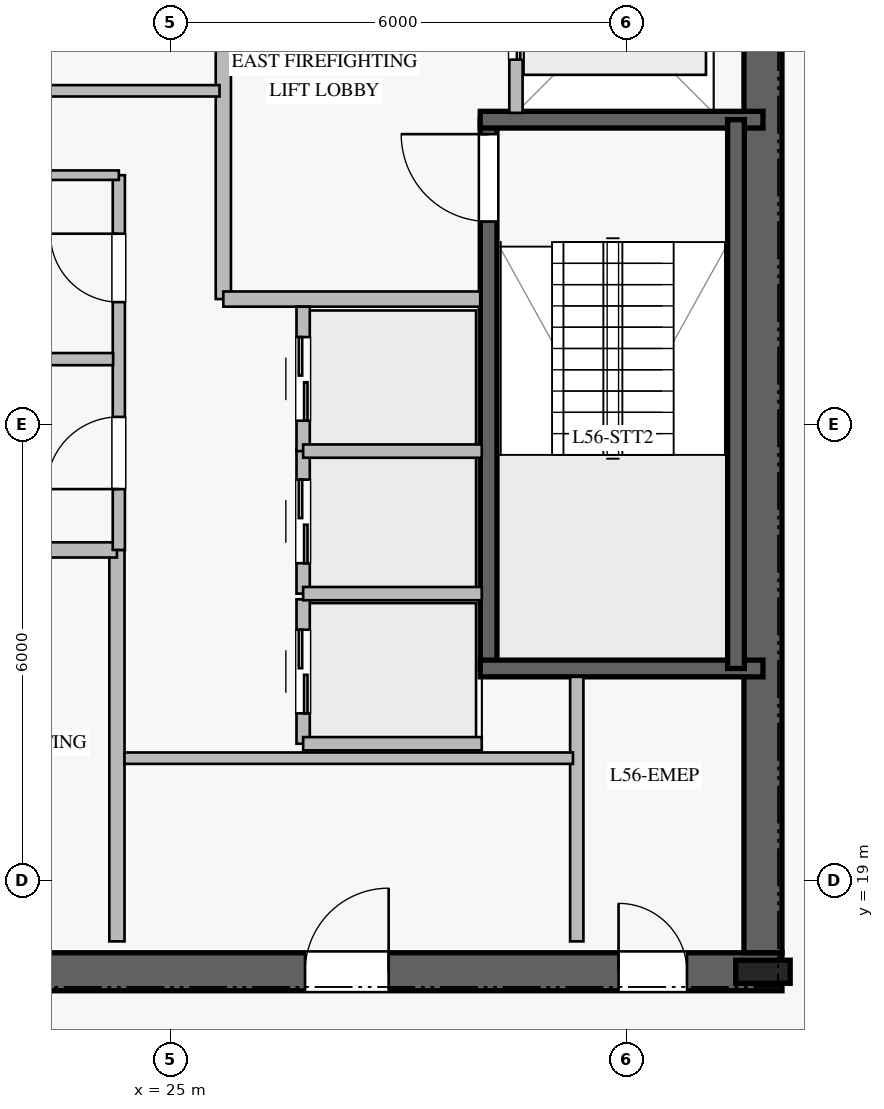
"""IFC4 building model, lengths in metres.
Left out: names, types, materials, properties, quantities, classifications, styles, units other than length and angle.
Written with IfcOpenShell. Run it as: python <this file> out.ifc"""

import sys

from ifc_helpers import new_model, si_unit, direction, frame, frame_2d, origin, origin_2d, place, context, subcontext, project, spatial, rectangle, i_section, extrude, element, fill, save


model = new_model("IFC4")
c1 = context("Model", 3, precision=1e-05, world=origin(), true_north=direction((0.0, 1.0)))
c2 = subcontext(c1, "Body", "Model", "MODEL_VIEW")
j1 = project(units=[si_unit("LENGTHUNIT", "METRE"), si_unit("PLANEANGLEUNIT", "RADIAN")], contexts=[c1])
p1 = place(None, origin())
s1 = spatial("IfcSite", under=j1, at=p1, CompositionType="ELEMENT")
p2 = place(p1, origin())
s2 = spatial("IfcBuilding", under=s1, at=p2, CompositionType="ELEMENT")
p3 = place(p2, frame((0.0, 0.0, 232.8)))
s3 = spatial("IfcBuildingStorey", under=s2, at=p3, CompositionType="ELEMENT", Elevation=232.8)
p4 = place(p3, frame((16.95, 17.8, 0.0), z_axis=(0.0, 0.0, 1.0), x_axis=(1.0, 0.0, 0.0)))
e1 = element("IfcWall", 1, at=p4, inside=s3, PredefinedType="SHEAR", context=c2, shape_type="SweptSolid", body=[
    extrude(rectangle(XDim=16.1, YDim=0.5, at=frame_2d((8.05, 0.0))), origin(), (0.0, 0.0, 1.0), 3.78),
])
p5 = place(p4, frame((5.0, 0.0, 0.0)))
e2 = element("IfcOpeningElement", 2, at=p5, cuts=e1, PredefinedType="OPENING", context=c2, shape_type="SweptSolid", body=[
    extrude(rectangle(XDim=1.2, YDim=2.25, at=frame_2d((0.6, 1.125))), frame((0.0, 0.26, 0.0), z_axis=(0.0, -1.0, 0.0), x_axis=(1.0, 0.0, 0.0)), (0.0, 0.0, 1.0), 0.52),
])
p6 = place(p4, frame((13.95, 0.0, 0.0)))
e3 = element("IfcOpeningElement", 3, at=p6, cuts=e1, PredefinedType="OPENING", context=c2, shape_type="SweptSolid", body=[
    extrude(rectangle(XDim=0.9, YDim=2.1, at=frame_2d((0.45, 1.05))), frame((0.0, 0.26, 0.0), z_axis=(0.0, -1.0, 0.0), x_axis=(1.0, 0.0, 0.0)), (0.0, 0.0, 1.0), 0.52),
])
p7 = place(p4, frame((9.825, 0.0, 0.0)))
e4 = element("IfcOpeningElement", 4, at=p7, cuts=e1, PredefinedType="OPENING", context=c2, shape_type="SweptSolid", body=[
    extrude(rectangle(XDim=1.1, YDim=2.2, at=frame_2d((0.55, 1.1))), frame((0.0, 0.26, 0.0), z_axis=(0.0, -1.0, 0.0), x_axis=(1.0, 0.0, 0.0)), (0.0, 0.0, 1.0), 0.52),
])
p8 = place(p3, frame((32.8, 18.05, 0.0), z_axis=(0.0, 0.0, 1.0), x_axis=(0.0, 1.0, 0.0)))
e5 = element("IfcWall", 5, at=p8, inside=s3, PredefinedType="SHEAR", context=c2, shape_type="SweptSolid", body=[
    extrude(rectangle(XDim=13.9, YDim=0.5, at=frame_2d((6.95, 0.0))), origin(), (0.0, 0.0, 1.0), 3.78),
])
p9 = place(p3, frame((32.8, 17.8, 0.0), z_axis=(0.0, 0.0, 1.0), x_axis=(1.0, 0.0, 0.0)))
e6 = element("IfcColumn", 6, at=p9, inside=s3, PredefinedType="COLUMN", context=c2, shape_type="SweptSolid", body=[
    extrude(i_section(OverallWidth=0.304, OverallDepth=0.716, WebThickness=0.021, FlangeThickness=0.04, at=origin_2d()), origin(), (0.0, 0.0, 1.0), 4.0),
])
p10 = place(p3, frame((29.19, 21.79, 0.0), z_axis=(0.0, 0.0, 1.0), x_axis=(0.0, 1.0, 0.0)))
e7 = element("IfcWall", 7, at=p10, inside=s3, PredefinedType="SOLIDWALL", context=c2, shape_type="SweptSolid", body=[
    extrude(rectangle(XDim=7.22, YDim=0.22, at=frame_2d((3.61, 0.0))), origin(), (0.0, 0.0, 1.0), 3.78),
])
p11 = place(p10, frame((5.88, 0.0, 0.0)))
e8 = element("IfcOpeningElement", 8, at=p11, cuts=e7, PredefinedType="OPENING", context=c2, shape_type="SweptSolid", body=[
    extrude(rectangle(XDim=1.15, YDim=2.2, at=frame_2d((0.575, 1.1))), frame((0.0, 0.12, 0.0), z_axis=(0.0, -1.0, 0.0), x_axis=(1.0, 0.0, 0.0)), (0.0, 0.0, 1.0), 0.24),
])
for number, where, z_axis, x_axis in (
    (9, (29.08, 21.79, 0.0), (0.0, 0.0, 1.0), (1.0, 0.0, 0.0)),
    (10, (29.08, 29.01, 0.0), (0.0, 0.0, 1.0), (1.0, 0.0, 0.0)),
):
    element("IfcWall", number, at=place(p3, frame(where, z_axis=z_axis, x_axis=x_axis)), inside=s3, PredefinedType="SOLIDWALL", context=c2, shape_type="SweptSolid", body=[
        extrude(rectangle(XDim=3.72, YDim=0.22, at=frame_2d((1.86, 0.0))), origin(), (0.0, 0.0, 1.0), 3.78),
    ])
p12 = place(p3, frame((32.445, 29.01, 0.0), z_axis=(0.0, 0.0, 1.0), x_axis=(0.0, -1.0, 0.0)))
e11 = element("IfcWall", 11, at=p12, inside=s3, PredefinedType="SOLIDWALL", context=c2, shape_type="SweptSolid", body=[
    extrude(rectangle(XDim=7.22, YDim=0.22, at=frame_2d((3.61, 0.0))), origin(), (0.0, 0.0, 1.0), 3.78),
])
p13 = place(p3, frame((24.3, 18.2, 0.0), z_axis=(0.0, 0.0, 1.0), x_axis=(0.0, 1.0, 0.0)))
e12 = element("IfcWall", 12, at=p13, inside=s3, PredefinedType="PARTITIONING", context=c2, shape_type="SweptSolid", body=[
    extrude(rectangle(XDim=5.15, YDim=0.2, at=frame_2d((2.575, 0.0))), origin(), (0.0, 0.0, 1.0), 3.78),
])
p14 = place(p3, frame((20.92, 23.35, 0.0), z_axis=(0.0, 0.0, 1.0), x_axis=(1.0, 0.0, 0.0)))
e13 = element("IfcWall", 13, at=p14, inside=s3, PredefinedType="PARTITIONING", context=c2, shape_type="SweptSolid", body=[
    extrude(rectangle(XDim=3.38, YDim=0.2, at=frame_2d((1.69, 0.0))), origin(), (0.0, 0.0, 1.0), 3.78),
])
p15 = place(p3, frame((25.7, 26.65, 0.0), z_axis=(0.0, 0.0, 1.0), x_axis=(0.0, 1.0, 0.0)))
e14 = element("IfcWall", 14, at=p15, inside=s3, PredefinedType="PARTITIONING", context=c2, shape_type="SweptSolid", body=[
    extrude(rectangle(XDim=5.15, YDim=0.2, at=frame_2d((2.575, 0.0))), origin(), (0.0, 0.0, 1.0), 3.78),
])
p16 = place(p3, frame((25.7, 26.65, 0.0), z_axis=(0.0, 0.0, 1.0), x_axis=(1.0, 0.0, 0.0)))
e15 = element("IfcWall", 15, at=p16, inside=s3, PredefinedType="PARTITIONING", context=c2, shape_type="SweptSolid", body=[
    extrude(rectangle(XDim=3.38, YDim=0.2, at=frame_2d((1.69, 0.0))), origin(), (0.0, 0.0, 1.0), 3.78),
])
p17 = place(p3, frame((24.325, 23.35, 0.0), z_axis=(0.0, 0.0, 1.0), x_axis=(0.0, 1.0, 0.0)))
e16 = element("IfcWall", 16, at=p17, inside=s3, PredefinedType="PLUMBINGWALL", context=c2, shape_type="SweptSolid", body=[
    extrude(rectangle(XDim=4.93, YDim=0.16, at=frame_2d((2.465, 0.0))), origin(), (0.0, 0.0, 1.0), 3.78),
])
p18 = place(p17, frame((0.8, 0.0, 0.0)))
e17 = element("IfcOpeningElement", 17, at=p18, cuts=e16, PredefinedType="OPENING", context=c2, shape_type="SweptSolid", body=[
    extrude(rectangle(XDim=0.95, YDim=2.1, at=frame_2d((0.475, 1.05))), frame((0.0, 0.09, 0.0), z_axis=(0.0, -1.0, 0.0), x_axis=(1.0, 0.0, 0.0)), (0.0, 0.0, 1.0), 0.18),
])
p19 = place(p17, frame((3.26, 0.0, 0.0)))
e18 = element("IfcOpeningElement", 18, at=p19, cuts=e16, PredefinedType="OPENING", context=c2, shape_type="SweptSolid", body=[
    extrude(rectangle(XDim=0.9, YDim=2.1, at=frame_2d((0.45, 1.05))), frame((0.0, 0.09, 0.0), z_axis=(0.0, -1.0, 0.0), x_axis=(1.0, 0.0, 0.0)), (0.0, 0.0, 1.0), 0.18),
])
p20 = place(p3, frame((20.92, 28.28, 0.0), z_axis=(0.0, 0.0, 1.0), x_axis=(1.0, 0.0, 0.0)))
e19 = element("IfcWall", 19, at=p20, inside=s3, PredefinedType="PARTITIONING", context=c2, shape_type="SweptSolid", body=[
    extrude(rectangle(XDim=3.405, YDim=0.125, at=frame_2d((1.703, 0.0))), origin(), (0.0, 0.0, 1.0), 3.78),
])
p21 = place(p3, frame((20.95, 25.86, 0.0), z_axis=(0.0, 0.0, 1.0), x_axis=(1.0, 0.0, 0.0)))
e20 = element("IfcWall", 20, at=p21, inside=s3, PredefinedType="PLUMBINGWALL", context=c2, shape_type="SweptSolid", body=[
    extrude(rectangle(XDim=3.3, YDim=0.16, at=frame_2d((1.65, 0.0))), origin(), (0.0, 0.0, 1.0), 3.78),
])
p22 = place(p3, frame((30.35, 18.2, 0.0), z_axis=(0.0, 0.0, 1.0), x_axis=(0.0, 1.0, 0.0)))
e21 = element("IfcWall", 21, at=p22, inside=s3, PredefinedType="PARTITIONING", context=c2, shape_type="SweptSolid", body=[
    extrude(rectangle(XDim=3.48, YDim=0.175, at=frame_2d((1.74, 0.0))), origin(), (0.0, 0.0, 1.0), 3.78),
])
p23 = place(p3, frame((24.4, 20.61, 0.0), z_axis=(0.0, 0.0, 1.0), x_axis=(1.0, 0.0, 0.0)))
e22 = element("IfcWall", 22, at=p23, inside=s3, PredefinedType="PARTITIONING", context=c2, shape_type="SweptSolid", body=[
    extrude(rectangle(XDim=5.9, YDim=0.15, at=frame_2d((2.95, 0.0))), origin(), (0.0, 0.0, 1.0), 3.78),
])
p24 = place(p3, frame((19.75, 29.39, 0.0), z_axis=(0.0, 0.0, 1.0), x_axis=(1.0, 0.0, 0.0)))
e23 = element("IfcWall", 23, at=p24, inside=s3, PredefinedType="PARTITIONING", context=c2, shape_type="SweptSolid", body=[
    extrude(rectangle(XDim=5.9, YDim=0.15, at=frame_2d((2.95, 0.0))), origin(), (0.0, 0.0, 1.0), 3.78),
])
p25 = place(p3, frame((26.75, 20.8, 0.0), z_axis=(0.0, 0.0, 1.0), x_axis=(0.0, 1.0, 0.0)))
e24 = element("IfcWall", 24, at=p25, inside=s3, PredefinedType="PARTITIONING", context=c2, shape_type="SweptSolid", body=[
    extrude(rectangle(XDim=1.9, YDim=0.175, at=frame_2d((0.95, 0.0))), origin(), (0.0, 0.0, 1.0), 3.78),
])
p26 = place(p25, frame((0.4, 0.0, 0.0)))
e25 = element("IfcOpeningElement", 25, at=p26, cuts=e24, PredefinedType="OPENING", context=c2, shape_type="SweptSolid", body=[
    extrude(rectangle(XDim=1.1, YDim=2.2, at=frame_2d((0.55, 1.1))), frame((0.0, 0.098, 0.0), z_axis=(0.0, -1.0, 0.0), x_axis=(1.0, 0.0, 0.0)), (0.0, 0.0, 1.0), 0.195),
])
p27 = place(p3, frame((26.75, 20.8, 0.0), z_axis=(0.0, 0.0, 1.0), x_axis=(1.0, 0.0, 0.0)))
e26 = element("IfcWall", 26, at=p27, inside=s3, PredefinedType="PARTITIONING", context=c2, shape_type="SweptSolid", body=[
    extrude(rectangle(XDim=2.35, YDim=0.175, at=frame_2d((1.175, 0.0))), origin(), (0.0, 0.0, 1.0), 3.78),
])
p28 = place(p3, frame((26.75, 22.775, 0.0), z_axis=(0.0, 0.0, 1.0), x_axis=(0.0, 1.0, 0.0)))
e27 = element("IfcWall", 27, at=p28, inside=s3, PredefinedType="PARTITIONING", context=c2, shape_type="SweptSolid", body=[
    extrude(rectangle(XDim=1.9, YDim=0.175, at=frame_2d((0.95, 0.0))), origin(), (0.0, 0.0, 1.0), 3.78),
])
p29 = place(p28, frame((0.4, 0.0, 0.0)))
e28 = element("IfcOpeningElement", 28, at=p29, cuts=e27, PredefinedType="OPENING", context=c2, shape_type="SweptSolid", body=[
    extrude(rectangle(XDim=1.1, YDim=2.2, at=frame_2d((0.55, 1.1))), frame((0.0, 0.098, 0.0), z_axis=(0.0, -1.0, 0.0), x_axis=(1.0, 0.0, 0.0)), (0.0, 0.0, 1.0), 0.195),
])
p30 = place(p3, frame((26.75, 22.775, 0.0), z_axis=(0.0, 0.0, 1.0), x_axis=(1.0, 0.0, 0.0)))
e29 = element("IfcWall", 29, at=p30, inside=s3, PredefinedType="PARTITIONING", context=c2, shape_type="SweptSolid", body=[
    extrude(rectangle(XDim=2.35, YDim=0.175, at=frame_2d((1.175, 0.0))), origin(), (0.0, 0.0, 1.0), 3.78),
])
p31 = place(p3, frame((26.75, 24.65, 0.0), z_axis=(0.0, 0.0, 1.0), x_axis=(0.0, 1.0, 0.0)))
e30 = element("IfcWall", 30, at=p31, inside=s3, PredefinedType="PARTITIONING", context=c2, shape_type="SweptSolid", body=[
    extrude(rectangle(XDim=1.9, YDim=0.175, at=frame_2d((0.95, 0.0))), origin(), (0.0, 0.0, 1.0), 3.78),
])
p32 = place(p31, frame((0.4, 0.0, 0.0)))
e31 = element("IfcOpeningElement", 31, at=p32, cuts=e30, PredefinedType="OPENING", context=c2, shape_type="SweptSolid", body=[
    extrude(rectangle(XDim=1.1, YDim=2.2, at=frame_2d((0.55, 1.1))), frame((0.0, 0.098, 0.0), z_axis=(0.0, -1.0, 0.0), x_axis=(1.0, 0.0, 0.0)), (0.0, 0.0, 1.0), 0.195),
])
p33 = place(p3, frame((26.75, 24.65, 0.0), z_axis=(0.0, 0.0, 1.0), x_axis=(1.0, 0.0, 0.0)))
e32 = element("IfcWall", 32, at=p33, inside=s3, PredefinedType="PARTITIONING", context=c2, shape_type="SweptSolid", body=[
    extrude(rectangle(XDim=2.35, YDim=0.175, at=frame_2d((1.175, 0.0))), origin(), (0.0, 0.0, 1.0), 3.78),
])
p34 = place(p3, frame((29.55, 29.1, 0.0), z_axis=(0.0, 0.0, 1.0), x_axis=(0.0, 1.0, 0.0)))
e33 = element("IfcWall", 33, at=p34, inside=s3, PredefinedType="PARTITIONING", context=c2, shape_type="SweptSolid", body=[
    extrude(rectangle(XDim=2.6, YDim=0.175, at=frame_2d((1.3, 0.0))), origin(), (0.0, 0.0, 1.0), 3.78),
])
p35 = place(p34, frame((0.7, 0.0, 0.0)))
e34 = element("IfcOpeningElement", 34, at=p35, cuts=e33, PredefinedType="OPENING", context=c2, shape_type="SweptSolid", body=[
    extrude(rectangle(XDim=1.2, YDim=2.2, at=frame_2d((0.6, 1.1))), frame((0.0, 0.098, 0.0), z_axis=(0.0, -1.0, 0.0), x_axis=(1.0, 0.0, 0.0)), (0.0, 0.0, 1.0), 0.195),
])
p36 = place(p11, origin())
e35 = element("IfcDoor", 35, at=p36, inside=s3, OperationType="SINGLE_SWING_RIGHT", PredefinedType="DOOR", context=c2, shape_type="SweptSolid", body=[
    extrude(rectangle(XDim=1.15, YDim=2.2, at=frame_2d((0.575, 1.1))), frame((0.0, 0.025, 0.0), z_axis=(0.0, -1.0, 0.0), x_axis=(1.0, 0.0, 0.0)), (0.0, 0.0, 1.0), 0.05),
])
fill(e8, e35)
p37 = place(p18, origin())
e36 = element("IfcDoor", 36, at=p37, inside=s3, OperationType="SINGLE_SWING_LEFT", PredefinedType="DOOR", context=c2, shape_type="SweptSolid", body=[
    extrude(rectangle(XDim=0.95, YDim=2.1, at=frame_2d((0.475, 1.05))), frame((0.0, 0.025, 0.0), z_axis=(0.0, -1.0, 0.0), x_axis=(1.0, 0.0, 0.0)), (0.0, 0.0, 1.0), 0.05),
])
fill(e17, e36)
p38 = place(p19, origin())
e37 = element("IfcDoor", 37, at=p38, inside=s3, OperationType="SINGLE_SWING_RIGHT", PredefinedType="DOOR", context=c2, shape_type="SweptSolid", body=[
    extrude(rectangle(XDim=0.9, YDim=2.1, at=frame_2d((0.45, 1.05))), frame((0.0, 0.025, 0.0), z_axis=(0.0, -1.0, 0.0), x_axis=(1.0, 0.0, 0.0)), (0.0, 0.0, 1.0), 0.05),
])
fill(e18, e37)
p39 = place(p6, origin())
e38 = element("IfcDoor", 38, at=p39, inside=s3, OperationType="SINGLE_SWING_LEFT", PredefinedType="DOOR", context=c2, shape_type="SweptSolid", body=[
    extrude(rectangle(XDim=0.9, YDim=2.1, at=frame_2d((0.45, 1.05))), frame((0.0, 0.025, 0.0), z_axis=(0.0, -1.0, 0.0), x_axis=(1.0, 0.0, 0.0)), (0.0, 0.0, 1.0), 0.05),
])
fill(e3, e38)
p40 = place(p7, origin())
e39 = element("IfcDoor", 39, at=p40, inside=s3, OperationType="SINGLE_SWING_RIGHT", PredefinedType="DOOR", context=c2, shape_type="SweptSolid", body=[
    extrude(rectangle(XDim=1.1, YDim=2.2, at=frame_2d((0.55, 1.1))), frame((0.0, 0.025, 0.0), z_axis=(0.0, -1.0, 0.0), x_axis=(1.0, 0.0, 0.0)), (0.0, 0.0, 1.0), 0.05),
])
fill(e4, e39)
p41 = place(p26, origin())
e40 = element("IfcDoor", 40, at=p41, inside=s3, OperationType="DOUBLE_DOOR_SLIDING", PredefinedType="DOOR", context=c2, shape_type="SweptSolid", body=[
    extrude(rectangle(XDim=1.1, YDim=2.2, at=frame_2d((0.55, 1.1))), frame((0.0, 0.025, 0.0), z_axis=(0.0, -1.0, 0.0), x_axis=(1.0, 0.0, 0.0)), (0.0, 0.0, 1.0), 0.05),
])
fill(e25, e40)
p42 = place(p29, origin())
e41 = element("IfcDoor", 41, at=p42, inside=s3, OperationType="DOUBLE_DOOR_SLIDING", PredefinedType="DOOR", context=c2, shape_type="SweptSolid", body=[
    extrude(rectangle(XDim=1.1, YDim=2.2, at=frame_2d((0.55, 1.1))), frame((0.0, 0.025, 0.0), z_axis=(0.0, -1.0, 0.0), x_axis=(1.0, 0.0, 0.0)), (0.0, 0.0, 1.0), 0.05),
])
fill(e28, e41)
p43 = place(p32, origin())
e42 = element("IfcDoor", 42, at=p43, inside=s3, OperationType="DOUBLE_DOOR_SLIDING", PredefinedType="DOOR", context=c2, shape_type="SweptSolid", body=[
    extrude(rectangle(XDim=1.1, YDim=2.2, at=frame_2d((0.55, 1.1))), frame((0.0, 0.025, 0.0), z_axis=(0.0, -1.0, 0.0), x_axis=(1.0, 0.0, 0.0)), (0.0, 0.0, 1.0), 0.05),
])
fill(e31, e42)
p44 = place(p35, origin())
e43 = element("IfcDoor", 43, at=p44, inside=s3, OperationType="DOUBLE_DOOR_SLIDING", PredefinedType="DOOR", context=c2, shape_type="SweptSolid", body=[
    extrude(rectangle(XDim=1.2, YDim=2.2, at=frame_2d((0.6, 1.1))), frame((0.0, 0.025, 0.0), z_axis=(0.0, -1.0, 0.0), x_axis=(1.0, 0.0, 0.0)), (0.0, 0.0, 1.0), 0.05),
])
fill(e34, e43)
save(model, sys.argv[1])
